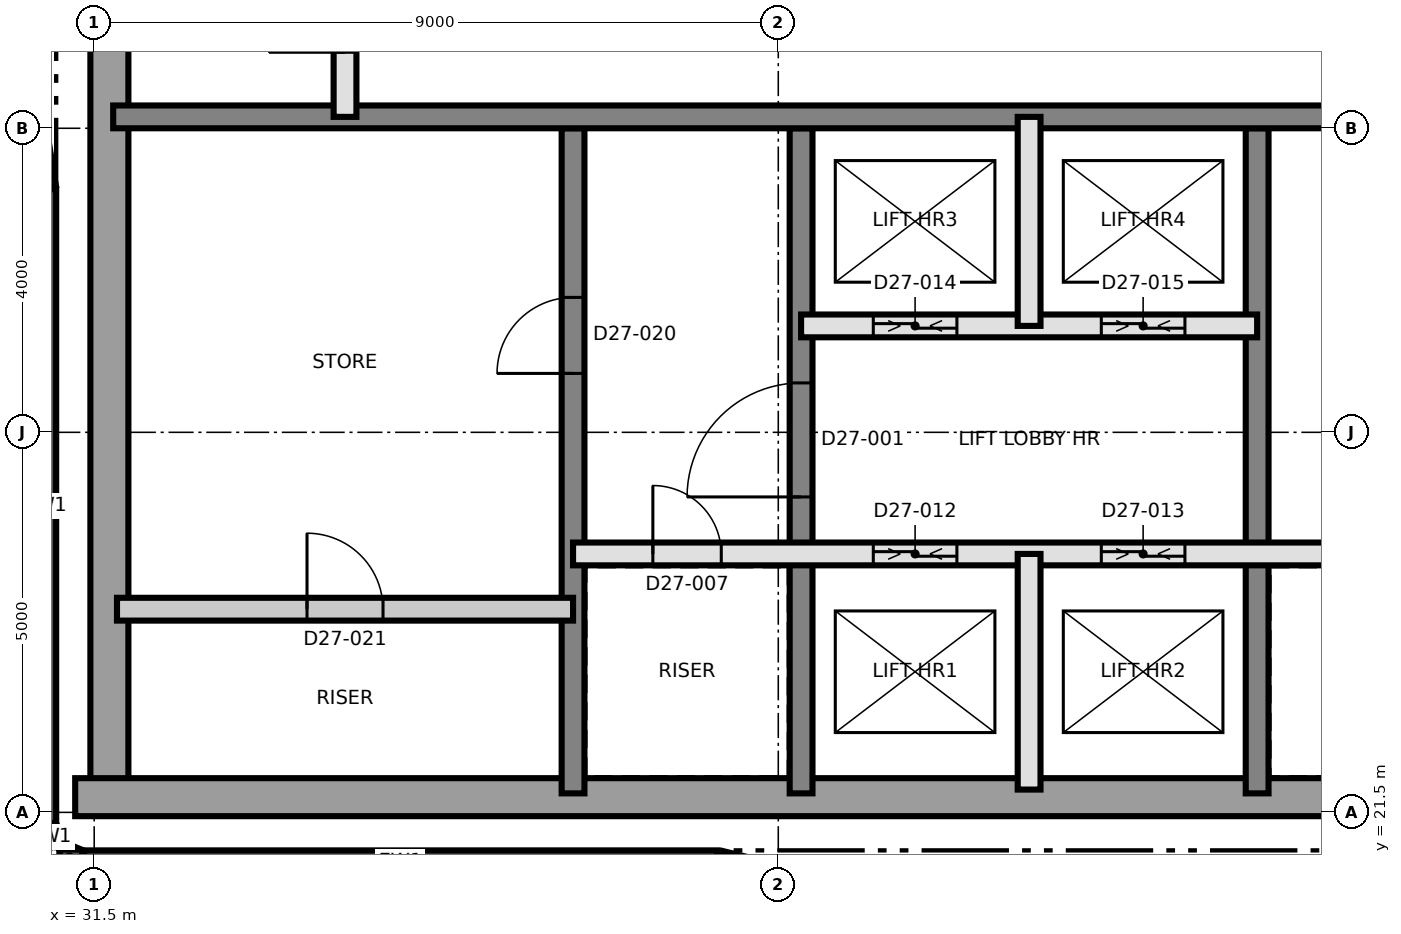
"""IFC4 building model, lengths in metres.
Left out: names, types, materials, properties, quantities, classifications, styles, units other than length and angle.
Written with IfcOpenShell. Run it as: python <this file> out.ifc"""

import sys

from ifc_helpers import new_model, si_unit, direction, frame, frame_2d, origin, place, context, subcontext, project, spatial, rectangle, extrude, element, fill, save


model = new_model("IFC4")
c1 = context("Model", 3, precision=1e-05, world=origin(), true_north=direction((0.0, 1.0)))
c2 = subcontext(c1, "Body", "Model", "MODEL_VIEW")
j1 = project(units=[si_unit("LENGTHUNIT", "METRE"), si_unit("PLANEANGLEUNIT", "RADIAN")], contexts=[c1])
p1 = place(None, origin())
s1 = spatial("IfcSite", under=j1, at=p1, CompositionType="ELEMENT")
p2 = place(p1, origin())
s2 = spatial("IfcBuilding", under=s1, at=p2, CompositionType="ELEMENT")
p3 = place(p2, frame((0.0, 0.0, 243.9)))
s3 = spatial("IfcBuildingStorey", under=s2, at=p3, CompositionType="ELEMENT", Elevation=243.9)
p4 = place(p3, frame((31.7, 21.75, 0.0), z_axis=(0.0, 0.0, 1.0), x_axis=(0.0, 1.0, 0.0)))
e1 = element("IfcWall", 1, at=p4, inside=s3, PredefinedType="SHEAR", context=c2, shape_type="SweptSolid", body=[
    extrude(rectangle(XDim=17.5, YDim=0.5, at=frame_2d((8.75, 0.0))), origin(), (0.0, 0.0, 1.0), 5.5),
])
p5 = place(p3, frame((31.25, 21.7, 0.0), z_axis=(0.0, 0.0, 1.0), x_axis=(1.0, 0.0, 0.0)))
e2 = element("IfcWall", 2, at=p5, inside=s3, PredefinedType="SHEAR", context=c2, shape_type="SweptSolid", body=[
    extrude(rectangle(XDim=27.0, YDim=0.5, at=frame_2d((13.5, 0.0))), origin(), (0.0, 0.0, 1.0), 5.5),
])
p6 = place(p3, frame((37.8, 21.75, 0.0), z_axis=(0.0, 0.0, 1.0), x_axis=(0.0, 1.0, 0.0)))
e3 = element("IfcWall", 3, at=p6, inside=s3, PredefinedType="SHEAR", context=c2, shape_type="SweptSolid", body=[
    extrude(rectangle(XDim=8.75, YDim=0.3, at=frame_2d((4.375, 0.0))), origin(), (0.0, 0.0, 1.0), 5.5),
])
p7 = place(p6, frame((5.525, 0.0, 0.0)))
e4 = element("IfcOpeningElement", 4, at=p7, cuts=e3, PredefinedType="OPENING", context=c2, shape_type="SweptSolid", body=[
    extrude(rectangle(XDim=1.0, YDim=2.1, at=frame_2d((0.5, 1.05))), frame((0.0, 0.16, 0.0), z_axis=(0.0, -1.0, 0.0), x_axis=(1.0, 0.0, 0.0)), (0.0, 0.0, 1.0), 0.32),
])
p8 = place(p3, frame((40.8, 21.75, 0.0), z_axis=(0.0, 0.0, 1.0), x_axis=(0.0, 1.0, 0.0)))
e5 = element("IfcWall", 5, at=p8, inside=s3, PredefinedType="SHEAR", context=c2, shape_type="SweptSolid", body=[
    extrude(rectangle(XDim=8.75, YDim=0.3, at=frame_2d((4.375, 0.0))), origin(), (0.0, 0.0, 1.0), 5.5),
])
p9 = place(p8, frame((3.9, 0.0, 0.0)))
e6 = element("IfcOpeningElement", 6, at=p9, cuts=e5, PredefinedType="OPENING", context=c2, shape_type="SweptSolid", body=[
    extrude(rectangle(XDim=1.5, YDim=2.1, at=frame_2d((0.75, 1.05))), frame((0.0, 0.16, 0.0), z_axis=(0.0, -1.0, 0.0), x_axis=(1.0, 0.0, 0.0)), (0.0, 0.0, 1.0), 0.32),
])
p10 = place(p3, frame((46.8, 21.75, 0.0), z_axis=(0.0, 0.0, 1.0), x_axis=(0.0, 1.0, 0.0)))
e7 = element("IfcWall", 7, at=p10, inside=s3, PredefinedType="SHEAR", context=c2, shape_type="SweptSolid", body=[
    extrude(rectangle(XDim=8.75, YDim=0.3, at=frame_2d((4.375, 0.0))), origin(), (0.0, 0.0, 1.0), 5.5),
])
p11 = place(p3, frame((31.75, 30.65, 0.0), z_axis=(0.0, 0.0, 1.0), x_axis=(1.0, 0.0, 0.0)))
e8 = element("IfcWall", 8, at=p11, inside=s3, PredefinedType="SHEAR", context=c2, shape_type="SweptSolid", body=[
    extrude(rectangle(XDim=26.5, YDim=0.3, at=frame_2d((13.25, 0.0))), origin(), (0.0, 0.0, 1.0), 5.5),
])
p12 = place(p11, frame((24.75, 0.0, 0.0)))
e9 = element("IfcOpeningElement", 9, at=p12, cuts=e8, PredefinedType="OPENING", context=c2, shape_type="SweptSolid", body=[
    extrude(rectangle(XDim=1.0, YDim=2.1, at=frame_2d((0.5, 1.05))), frame((0.0, 0.16, 0.0), z_axis=(0.0, -1.0, 0.0), x_axis=(1.0, 0.0, 0.0)), (0.0, 0.0, 1.0), 0.32),
])
p13 = place(p3, frame((30.85, 29.699, 0.0), z_axis=(0.0, 0.0, 1.0), x_axis=(0.0, -1.0, 0.0)))
e10 = element("IfcWall", 10, at=p13, inside=s3, PredefinedType="SOLIDWALL", context=c2, shape_type="SweptSolid", body=[
    extrude(rectangle(XDim=8.34, YDim=0.3, at=frame_2d((4.17, 0.0))), origin(), (0.0, 0.0, 1.0), 5.2),
])
for number, where, z_axis, x_axis in (
    (11, (30.861, 21.302, 0.0), (0.0, 0.0, 1.0), (0.383, -0.924, 0.0)),
    (12, (31.048, 20.967, 0.0), (0.0, 0.0, 1.0), (0.924, -0.383, 0.0)),
):
    element("IfcWall", number, at=place(p3, frame(where, z_axis=z_axis, x_axis=x_axis)), inside=s3, PredefinedType="SOLIDWALL", context=c2, shape_type="SweptSolid", body=[
        extrude(rectangle(XDim=0.275, YDim=0.3, at=frame_2d((0.138, 0.0))), origin(), (0.0, 0.0, 1.0), 5.2),
    ])
p14 = place(p3, frame((31.36, 20.85, 0.0), z_axis=(0.0, 0.0, 1.0), x_axis=(1.0, 0.0, 0.0)))
e13 = element("IfcWall", 13, at=p14, inside=s3, PredefinedType="SOLIDWALL", context=c2, shape_type="SweptSolid", body=[
    extrude(rectangle(XDim=8.34, YDim=0.3, at=frame_2d((4.17, 0.0))), origin(), (0.0, 0.0, 1.0), 5.2),
])
p15 = place(p3, frame((39.735, 20.846, 0.0), z_axis=(0.0, 0.0, 1.0), x_axis=(0.97206095595, -0.234728562212, 0.0)))
e14 = element("IfcWall", 14, at=p15, inside=s3, PredefinedType="SOLIDWALL", context=c2, shape_type="SweptSolid", body=[
    extrude(rectangle(XDim=2.35, YDim=0.3, at=frame_2d((1.175, 0.0))), origin(), (0.0, 0.0, 1.0), 5.2),
])
p16 = place(p3, frame((30.152, 34.0, 0.0), z_axis=(0.0, 0.0, 1.0), x_axis=(0.160697303067, -0.987003736967, 0.0)))
e15 = element("IfcWall", 15, at=p16, inside=s3, PredefinedType="SOLIDWALL", context=c2, shape_type="SweptSolid", body=[
    extrude(rectangle(XDim=4.333, YDim=0.3, at=frame_2d((2.167, 0.0))), origin(), (0.0, 0.0, 1.0), 5.2),
])
p17 = place(p3, frame((31.8, 24.173, 0.0), z_axis=(0.0, 0.0, 1.0), x_axis=(1.0, 0.0, 0.0)))
e16 = element("IfcWall", 16, at=p17, inside=s3, PredefinedType="PARTITIONING", context=c2, shape_type="SweptSolid", body=[
    extrude(rectangle(XDim=6.0, YDim=0.3, at=frame_2d((3.0, 0.0))), origin(), (0.0, 0.0, 1.0), 5.2),
])
p18 = place(p17, frame((2.5, 0.0, 0.0)))
e17 = element("IfcOpeningElement", 17, at=p18, cuts=e16, PredefinedType="OPENING", context=c2, shape_type="SweptSolid", body=[
    extrude(rectangle(XDim=1.0, YDim=2.1, at=frame_2d((0.5, 1.05))), frame((0.0, 0.16, 0.0), z_axis=(0.0, -1.0, 0.0), x_axis=(1.0, 0.0, 0.0)), (0.0, 0.0, 1.0), 0.32),
])
p19 = place(p3, frame((37.8, 24.9, 0.0), z_axis=(0.0, 0.0, 1.0), x_axis=(1.0, 0.0, 0.0)))
e18 = element("IfcWall", 18, at=p19, inside=s3, PredefinedType="SOLIDWALL", context=c2, shape_type="SweptSolid", body=[
    extrude(rectangle(XDim=12.0, YDim=0.3, at=frame_2d((6.0, 0.0))), origin(), (0.0, 0.0, 1.0), 5.2),
])
p20 = place(p19, frame((1.05, 0.0, 0.0)))
e19 = element("IfcOpeningElement", 19, at=p20, cuts=e18, PredefinedType="OPENING", context=c2, shape_type="SweptSolid", body=[
    extrude(rectangle(XDim=0.9, YDim=2.1, at=frame_2d((0.45, 1.05))), frame((0.0, 0.16, 0.0), z_axis=(0.0, -1.0, 0.0), x_axis=(1.0, 0.0, 0.0)), (0.0, 0.0, 1.0), 0.32),
])
p21 = place(p19, frame((10.05, 0.0, 0.0)))
e20 = element("IfcOpeningElement", 20, at=p21, cuts=e18, PredefinedType="OPENING", context=c2, shape_type="SweptSolid", body=[
    extrude(rectangle(XDim=0.9, YDim=2.1, at=frame_2d((0.45, 1.05))), frame((0.0, 0.16, 0.0), z_axis=(0.0, -1.0, 0.0), x_axis=(1.0, 0.0, 0.0)), (0.0, 0.0, 1.0), 0.32),
])
p22 = place(p19, frame((3.95, 0.0, 0.0)))
e21 = element("IfcOpeningElement", 21, at=p22, cuts=e18, PredefinedType="OPENING", context=c2, shape_type="SweptSolid", body=[
    extrude(rectangle(XDim=1.1, YDim=2.4, at=frame_2d((0.55, 1.2))), frame((0.0, 0.16, 0.0), z_axis=(0.0, -1.0, 0.0), x_axis=(1.0, 0.0, 0.0)), (0.0, 0.0, 1.0), 0.32),
])
p23 = place(p19, frame((6.95, 0.0, 0.0)))
e22 = element("IfcOpeningElement", 22, at=p23, cuts=e18, PredefinedType="OPENING", context=c2, shape_type="SweptSolid", body=[
    extrude(rectangle(XDim=1.1, YDim=2.4, at=frame_2d((0.55, 1.2))), frame((0.0, 0.16, 0.0), z_axis=(0.0, -1.0, 0.0), x_axis=(1.0, 0.0, 0.0)), (0.0, 0.0, 1.0), 0.32),
])
p24 = place(p3, frame((40.8, 27.9, 0.0), z_axis=(0.0, 0.0, 1.0), x_axis=(1.0, 0.0, 0.0)))
e23 = element("IfcWall", 23, at=p24, inside=s3, PredefinedType="SOLIDWALL", context=c2, shape_type="SweptSolid", body=[
    extrude(rectangle(XDim=6.0, YDim=0.3, at=frame_2d((3.0, 0.0))), origin(), (0.0, 0.0, 1.0), 5.2),
])
p25 = place(p24, frame((0.95, 0.0, 0.0)))
e24 = element("IfcOpeningElement", 24, at=p25, cuts=e23, PredefinedType="OPENING", context=c2, shape_type="SweptSolid", body=[
    extrude(rectangle(XDim=1.1, YDim=2.4, at=frame_2d((0.55, 1.2))), frame((0.0, 0.16, 0.0), z_axis=(0.0, -1.0, 0.0), x_axis=(1.0, 0.0, 0.0)), (0.0, 0.0, 1.0), 0.32),
])
p26 = place(p24, frame((3.95, 0.0, 0.0)))
e25 = element("IfcOpeningElement", 25, at=p26, cuts=e23, PredefinedType="OPENING", context=c2, shape_type="SweptSolid", body=[
    extrude(rectangle(XDim=1.1, YDim=2.4, at=frame_2d((0.55, 1.2))), frame((0.0, 0.16, 0.0), z_axis=(0.0, -1.0, 0.0), x_axis=(1.0, 0.0, 0.0)), (0.0, 0.0, 1.0), 0.32),
])
p27 = place(p3, frame((34.8, 30.65, 0.0), z_axis=(0.0, 0.0, 1.0), x_axis=(0.0, 1.0, 0.0)))
e26 = element("IfcWall", 26, at=p27, inside=s3, PredefinedType="SOLIDWALL", context=c2, shape_type="SweptSolid", body=[
    extrude(rectangle(XDim=2.7, YDim=0.3, at=frame_2d((1.35, 0.0))), origin(), (0.0, 0.0, 1.0), 5.2),
])
p28 = place(p27, frame((0.85, 0.0, 0.0)))
e27 = element("IfcOpeningElement", 27, at=p28, cuts=e26, PredefinedType="OPENING", context=c2, shape_type="SweptSolid", body=[
    extrude(rectangle(XDim=1.0, YDim=2.1, at=frame_2d((0.5, 1.05))), frame((0.0, 0.16, 0.0), z_axis=(0.0, -1.0, 0.0), x_axis=(1.0, 0.0, 0.0)), (0.0, 0.0, 1.0), 0.32),
])
p29 = place(p3, frame((43.8, 21.8, 0.0), z_axis=(0.0, 0.0, 1.0), x_axis=(0.0, 1.0, 0.0)))
e28 = element("IfcWall", 28, at=p29, inside=s3, PredefinedType="SOLIDWALL", context=c2, shape_type="SweptSolid", body=[
    extrude(rectangle(XDim=3.1, YDim=0.3, at=frame_2d((1.55, 0.0))), origin(), (0.0, 0.0, 1.0), 5.2),
])
p30 = place(p3, frame((43.8, 27.9, 0.0), z_axis=(0.0, 0.0, 1.0), x_axis=(0.0, 1.0, 0.0)))
e29 = element("IfcWall", 29, at=p30, inside=s3, PredefinedType="SOLIDWALL", context=c2, shape_type="SweptSolid", body=[
    extrude(rectangle(XDim=2.75, YDim=0.3, at=frame_2d((1.375, 0.0))), origin(), (0.0, 0.0, 1.0), 5.2),
])
p31 = place(p9, origin())
e30 = element("IfcDoor", 30, at=p31, inside=s3, OperationType="SINGLE_SWING_RIGHT", PredefinedType="DOOR", context=c2, shape_type="SweptSolid", body=[
    extrude(rectangle(XDim=1.5, YDim=2.1, at=frame_2d((0.75, 1.05))), frame((0.0, 0.025, 0.0), z_axis=(0.0, -1.0, 0.0), x_axis=(1.0, 0.0, 0.0)), (0.0, 0.0, 1.0), 0.05),
])
fill(e6, e30)
p32 = place(p20, origin())
e31 = element("IfcDoor", 31, at=p32, inside=s3, OperationType="SINGLE_SWING_LEFT", PredefinedType="DOOR", context=c2, shape_type="SweptSolid", body=[
    extrude(rectangle(XDim=0.9, YDim=2.1, at=frame_2d((0.45, 1.05))), frame((0.0, 0.025, 0.0), z_axis=(0.0, -1.0, 0.0), x_axis=(1.0, 0.0, 0.0)), (0.0, 0.0, 1.0), 0.05),
])
fill(e19, e31)
p33 = place(p22, origin())
e32 = element("IfcDoor", 32, at=p33, inside=s3, OperationType="SLIDING_TO_LEFT", PredefinedType="DOOR", context=c2, shape_type="SweptSolid", body=[
    extrude(rectangle(XDim=1.1, YDim=2.4, at=frame_2d((0.55, 1.2))), frame((0.0, 0.025, 0.0), z_axis=(0.0, -1.0, 0.0), x_axis=(1.0, 0.0, 0.0)), (0.0, 0.0, 1.0), 0.05),
])
fill(e21, e32)
p34 = place(p23, origin())
e33 = element("IfcDoor", 33, at=p34, inside=s3, OperationType="SLIDING_TO_LEFT", PredefinedType="DOOR", context=c2, shape_type="SweptSolid", body=[
    extrude(rectangle(XDim=1.1, YDim=2.4, at=frame_2d((0.55, 1.2))), frame((0.0, 0.025, 0.0), z_axis=(0.0, -1.0, 0.0), x_axis=(1.0, 0.0, 0.0)), (0.0, 0.0, 1.0), 0.05),
])
fill(e22, e33)
p35 = place(p25, origin())
e34 = element("IfcDoor", 34, at=p35, inside=s3, OperationType="SLIDING_TO_LEFT", PredefinedType="DOOR", context=c2, shape_type="SweptSolid", body=[
    extrude(rectangle(XDim=1.1, YDim=2.4, at=frame_2d((0.55, 1.2))), frame((0.0, 0.025, 0.0), z_axis=(0.0, -1.0, 0.0), x_axis=(1.0, 0.0, 0.0)), (0.0, 0.0, 1.0), 0.05),
])
fill(e24, e34)
p36 = place(p26, origin())
e35 = element("IfcDoor", 35, at=p36, inside=s3, OperationType="SLIDING_TO_LEFT", PredefinedType="DOOR", context=c2, shape_type="SweptSolid", body=[
    extrude(rectangle(XDim=1.1, YDim=2.4, at=frame_2d((0.55, 1.2))), frame((0.0, 0.025, 0.0), z_axis=(0.0, -1.0, 0.0), x_axis=(1.0, 0.0, 0.0)), (0.0, 0.0, 1.0), 0.05),
])
fill(e25, e35)
p37 = place(p7, origin())
e36 = element("IfcDoor", 36, at=p37, inside=s3, OperationType="SINGLE_SWING_LEFT", PredefinedType="DOOR", context=c2, shape_type="SweptSolid", body=[
    extrude(rectangle(XDim=1.0, YDim=2.1, at=frame_2d((0.5, 1.05))), frame((0.0, 0.025, 0.0), z_axis=(0.0, -1.0, 0.0), x_axis=(1.0, 0.0, 0.0)), (0.0, 0.0, 1.0), 0.05),
])
fill(e4, e36)
p38 = place(p18, origin())
e37 = element("IfcDoor", 37, at=p38, inside=s3, OperationType="SINGLE_SWING_RIGHT", PredefinedType="DOOR", context=c2, shape_type="SweptSolid", body=[
    extrude(rectangle(XDim=1.0, YDim=2.1, at=frame_2d((0.5, 1.05))), frame((0.0, 0.025, 0.0), z_axis=(0.0, -1.0, 0.0), x_axis=(1.0, 0.0, 0.0)), (0.0, 0.0, 1.0), 0.05),
])
fill(e17, e37)
save(model, sys.argv[1])
